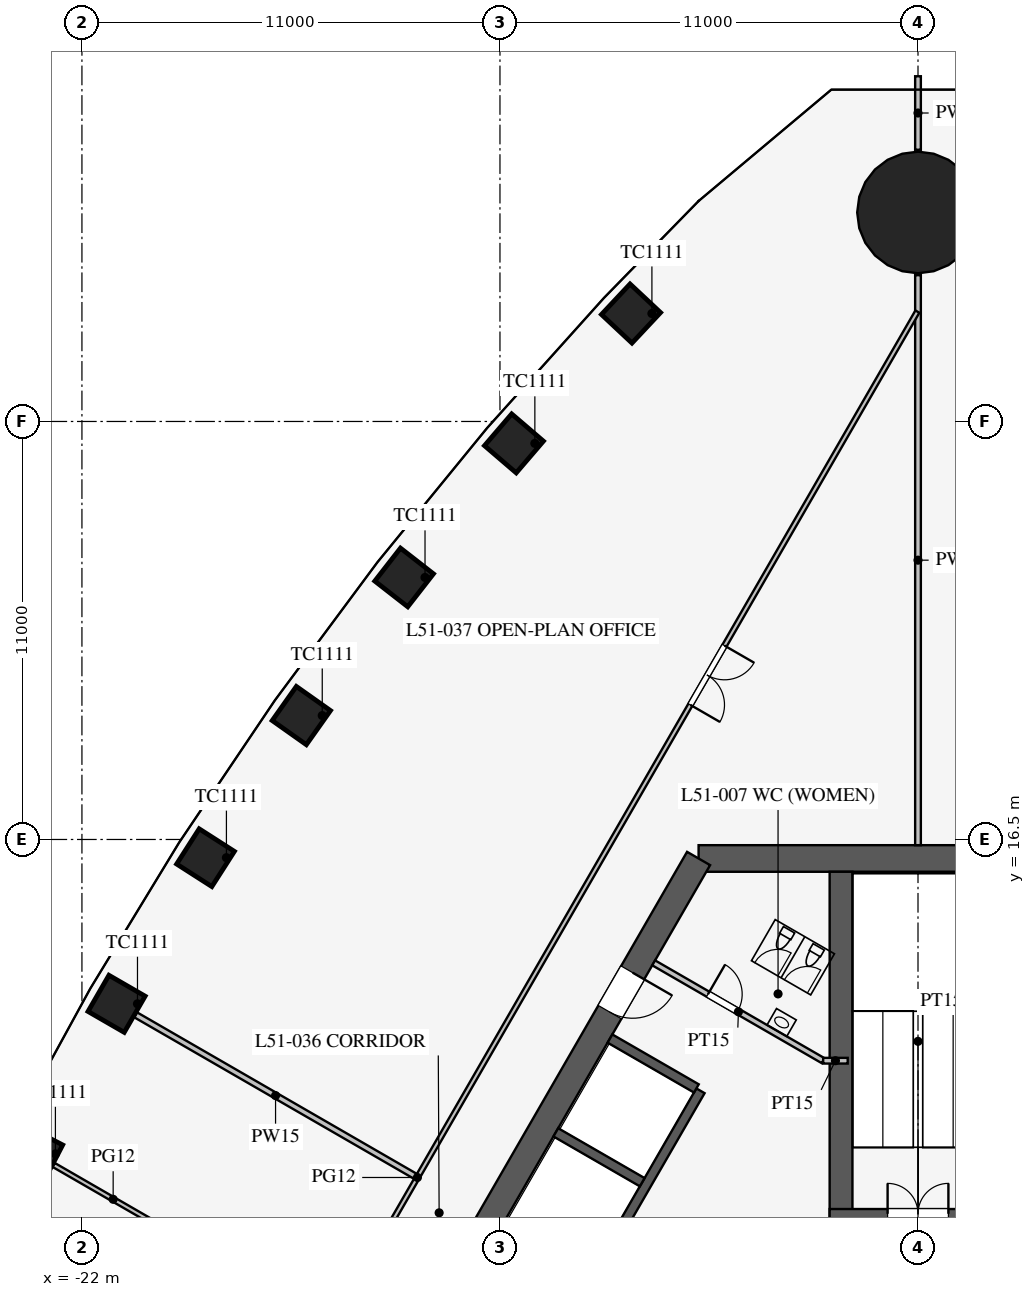
"""IFC4 building model, lengths in metres.
Left out: names, types, materials, properties, quantities, classifications, styles, units other than length and angle.
Written with IfcOpenShell. Run it as: python <this file> out.ifc"""

import sys

from ifc_helpers import new_model, si_unit, direction, frame, frame_2d, origin, origin_2d, place, context, subcontext, project, spatial, rectangle, circle, extrude, element, fill, save


model = new_model("IFC4")
c1 = context("Model", 3, precision=1e-05, world=origin(), true_north=direction((0.0, 1.0)))
c2 = subcontext(c1, "Body", "Model", "MODEL_VIEW")
j1 = project(units=[si_unit("LENGTHUNIT", "METRE"), si_unit("PLANEANGLEUNIT", "RADIAN")], contexts=[c1])
p1 = place(None, origin())
s1 = spatial("IfcSite", under=j1, at=p1, CompositionType="ELEMENT")
p2 = place(p1, origin())
s2 = spatial("IfcBuilding", under=s1, at=p2, CompositionType="ELEMENT")
p3 = place(p2, frame((0.0, 0.0, 223.3)))
s3 = spatial("IfcBuildingStorey", under=s2, at=p3, CompositionType="ELEMENT", Elevation=223.3)
for number, where, z_axis, x_axis in (
    (1, (-7.552, 30.341, 0.0), (0.0, 0.0, 1.0), (-0.684, -0.73, 0.0)),
    (2, (-10.632, 26.923, 0.0), (0.0, 0.0, 1.0), (-0.651, -0.759, 0.0)),
    (3, (-13.522, 23.396, 0.0), (0.0, 0.0, 1.0), (-0.615, -0.789, 0.0)),
    (4, (-16.227, 19.761, 0.0), (0.0, 0.0, 1.0), (-0.577, -0.816, 0.0)),
    (5, (-18.748, 16.02, 0.0), (0.0, 0.0, 1.0), (-0.539, -0.842, 0.0)),
    (6, (-21.088, 12.175, 0.0), (0.0, 0.0, 1.0), (-0.5, -0.866, 0.0)),
    (7, (-23.248, 8.226, 0.0), (0.0, 0.0, 1.0), (-0.46, -0.888, 0.0)),
):
    element("IfcColumn", number, at=place(p3, frame(where, z_axis=z_axis, x_axis=x_axis)), inside=s3, PredefinedType="COLUMN", context=c2, shape_type="SweptSolid", body=[
        extrude(rectangle(XDim=1.1, YDim=1.1, at=origin_2d()), origin(), (0.0, 0.0, 1.0), 4.2),
    ])
p4 = place(p3, frame((0.0, 33.0, 0.0), z_axis=(0.0, 0.0, 1.0), x_axis=(1.0, 0.0, 0.0)))
e8 = element("IfcColumn", 8, at=p4, inside=s3, PredefinedType="COLUMN", context=c2, shape_type="SweptSolid", body=[
    extrude(circle(Radius=1.6, at=origin_2d()), origin(), (0.0, 0.0, 1.0), 4.2),
])
p5 = place(p3, frame((5.773, 16.0, 0.0), z_axis=(0.0, 0.0, 1.0), x_axis=(-1.0, 0.0, 0.0)))
e9 = element("IfcWall", 9, at=p5, inside=s3, PredefinedType="SHEAR", context=c2, shape_type="SweptSolid", body=[
    extrude(rectangle(XDim=11.547, YDim=0.7, at=frame_2d((5.773, 0.0))), origin(), (0.0, 0.0, 1.0), 4.2),
])
p6 = place(p3, frame((-5.773, 16.0, 0.0), z_axis=(0.0, 0.0, 1.0), x_axis=(-0.500002442456, -0.866023993627, 0.0)))
e10 = element("IfcWall", 10, at=p6, inside=s3, PredefinedType="SHEAR", context=c2, shape_type="SweptSolid", body=[
    extrude(rectangle(XDim=21.939, YDim=0.7, at=frame_2d((10.97, 0.0))), origin(), (0.0, 0.0, 1.0), 4.2),
])
p7 = place(p6, frame((17.27, 0.0, 0.0)))
e11 = element("IfcOpeningElement", 11, at=p7, cuts=e10, PredefinedType="OPENING", context=c2, shape_type="SweptSolid", body=[
    extrude(rectangle(XDim=1.2, YDim=2.1, at=frame_2d((0.6, 1.05))), frame((0.0, 0.36, 0.0), z_axis=(0.0, -1.0, 0.0), x_axis=(1.0, 0.0, 0.0)), (0.0, 0.0, 1.0), 0.72),
])
p8 = place(p6, frame((3.47, 0.0, 0.0)))
e12 = element("IfcOpeningElement", 12, at=p8, cuts=e10, PredefinedType="OPENING", context=c2, shape_type="SweptSolid", body=[
    extrude(rectangle(XDim=1.2, YDim=2.1, at=frame_2d((0.6, 1.05))), frame((0.0, 0.36, 0.0), z_axis=(0.0, -1.0, 0.0), x_axis=(1.0, 0.0, 0.0)), (0.0, 0.0, 1.0), 0.72),
])
p9 = place(p3, frame((-5.724, 9.886, 0.0), z_axis=(0.0, 0.0, 1.0), x_axis=(-0.500001763848, -0.866024385424, 0.0)))
e13 = element("IfcWall", 13, at=p9, inside=s3, PredefinedType="SHEAR", context=c2, shape_type="SweptSolid", body=[
    extrude(rectangle(XDim=11.4, YDim=0.25, at=frame_2d((5.7, 0.0))), origin(), (0.0, 0.0, 1.0), 4.2),
])
p10 = place(p9, frame((6.525, 0.0, 0.0)))
e14 = element("IfcOpeningElement", 14, at=p10, cuts=e13, PredefinedType="OPENING", context=c2, shape_type="SweptSolid", body=[
    extrude(rectangle(XDim=1.2, YDim=2.2, at=frame_2d((0.6, 1.1))), frame((0.0, 0.135, 0.0), z_axis=(0.0, -1.0, 0.0), x_axis=(1.0, 0.0, 0.0)), (0.0, 0.0, 1.0), 0.27),
])
p11 = place(p9, frame((9.375, 0.0, 0.0)))
e15 = element("IfcOpeningElement", 15, at=p11, cuts=e13, PredefinedType="OPENING", context=c2, shape_type="SweptSolid", body=[
    extrude(rectangle(XDim=1.2, YDim=2.2, at=frame_2d((0.6, 1.1))), frame((0.0, 0.135, 0.0), z_axis=(0.0, -1.0, 0.0), x_axis=(1.0, 0.0, 0.0)), (0.0, 0.0, 1.0), 0.27),
])
for number, where, z_axis, x_axis in (
    (16, (-5.832, 9.949, 0.0), (0.0, 0.0, 1.0), (-0.866, 0.5, 0.0)),
    (17, (-7.257, 7.481, 0.0), (0.0, 0.0, 1.0), (-0.866, 0.5, 0.0)),
):
    element("IfcWall", number, at=place(p3, frame(where, z_axis=z_axis, x_axis=x_axis)), inside=s3, PredefinedType="SHEAR", context=c2, shape_type="SweptSolid", body=[
        extrude(rectangle(XDim=2.625, YDim=0.25, at=frame_2d((1.312, 0.0))), origin(), (0.0, 0.0, 1.0), 4.2),
    ])
p12 = place(p3, frame((-2.025, 6.525, 0.0), z_axis=(0.0, 0.0, 1.0), x_axis=(0.0, 1.0, 0.0)))
e18 = element("IfcWall", 18, at=p12, inside=s3, PredefinedType="SHEAR", context=c2, shape_type="SweptSolid", body=[
    extrude(rectangle(XDim=9.125, YDim=0.6, at=frame_2d((4.562, 0.0))), origin(), (0.0, 0.0, 1.0), 4.2),
])
p13 = place(p3, frame((2.325, 6.65, 0.0), z_axis=(0.0, 0.0, 1.0), x_axis=(-1.0, 0.0, 0.0)))
e19 = element("IfcWall", 19, at=p13, inside=s3, PredefinedType="SHEAR", context=c2, shape_type="SweptSolid", body=[
    extrude(rectangle(XDim=4.65, YDim=0.25, at=frame_2d((2.325, 0.0))), origin(), (0.0, 0.0, 1.0), 4.2),
])
p14 = place(p13, frame((1.525, 0.0, 0.0)))
e20 = element("IfcOpeningElement", 20, at=p14, cuts=e19, PredefinedType="OPENING", context=c2, shape_type="SweptSolid", body=[
    extrude(rectangle(XDim=1.6, YDim=2.1, at=frame_2d((0.8, 1.05))), frame((0.0, 0.135, 0.0), z_axis=(0.0, -1.0, 0.0), x_axis=(1.0, 0.0, 0.0)), (0.0, 0.0, 1.0), 0.27),
])
p15 = place(p3, frame((-2.495, 10.678, 0.0), z_axis=(0.0, 0.0, 1.0), x_axis=(-0.866037967349, 0.499978238636, 0.0)))
e21 = element("IfcWall", 21, at=p15, inside=s3, PredefinedType="PARTITIONING", context=c2, shape_type="SweptSolid", body=[
    extrude(rectangle(XDim=5.15, YDim=0.15, at=frame_2d((2.575, 0.0))), origin(), (0.0, 0.0, 1.0), 4.0),
])
p16 = place(p15, frame((2.6, 0.0, 0.0)))
e22 = element("IfcOpeningElement", 22, at=p16, cuts=e21, PredefinedType="OPENING", context=c2, shape_type="SweptSolid", body=[
    extrude(rectangle(XDim=0.9, YDim=2.1, at=frame_2d((0.45, 1.05))), frame((0.0, 0.085, 0.0), z_axis=(0.0, -1.0, 0.0), x_axis=(1.0, 0.0, 0.0)), (0.0, 0.0, 1.0), 0.17),
])
p17 = place(p3, frame((-2.495, 10.678, 0.0), z_axis=(0.0, 0.0, 1.0), x_axis=(1.0, 0.0, 0.0)))
e23 = element("IfcWall", 23, at=p17, inside=s3, PredefinedType="PARTITIONING", context=c2, shape_type="SweptSolid", body=[
    extrude(rectangle(XDim=0.645, YDim=0.15, at=frame_2d((0.323, 0.0))), origin(), (0.0, 0.0, 1.0), 4.0),
])
p18 = place(p3, frame((0.0, 16.35, 0.0), z_axis=(0.0, 0.0, 1.0), x_axis=(0.0, 1.0, 0.0)))
e24 = element("IfcWall", 24, at=p18, inside=s3, PredefinedType="PARTITIONING", context=c2, shape_type="SweptSolid", body=[
    extrude(rectangle(XDim=15.0, YDim=0.15, at=frame_2d((7.5, 0.0))), origin(), (0.0, 0.0, 1.0), 2.4),
])
p19 = place(p3, frame((0.0, 34.65, 0.0), z_axis=(0.0, 0.0, 1.0), x_axis=(0.0, 1.0, 0.0)))
e25 = element("IfcWall", 25, at=p19, inside=s3, PredefinedType="PARTITIONING", context=c2, shape_type="SweptSolid", body=[
    extrude(rectangle(XDim=1.935, YDim=0.15, at=frame_2d((0.967, 0.0))), origin(), (0.0, 0.0, 1.0), 2.4),
])
p20 = place(p3, frame((-13.224, 7.635, 0.0), z_axis=(0.0, 0.0, 1.0), x_axis=(-0.86603062717, 0.499990952723, 0.0)))
e26 = element("IfcWall", 26, at=p20, inside=s3, PredefinedType="PARTITIONING", context=c2, shape_type="SweptSolid", body=[
    extrude(rectangle(XDim=8.501, YDim=0.15, at=frame_2d((4.25, 0.0))), origin(), (0.0, 0.0, 1.0), 3.3),
])
p21 = place(p3, frame((-0.016, 30.392, 0.0), z_axis=(0.0, 0.0, 1.0), x_axis=(-0.500000626146, -0.866025042278, 0.0)))
e27 = element("IfcWall", 27, at=p21, inside=s3, PredefinedType="PARTITIONING", context=c2, shape_type="SweptSolid", body=[
    extrude(rectangle(XDim=52.624, YDim=0.12, at=frame_2d((26.312, 0.0))), origin(), (0.0, 0.0, 1.0), 2.9),
])
p22 = place(p21, frame((10.15, 0.0, 0.15)))
e28 = element("IfcOpeningElement", 28, at=p22, cuts=e27, PredefinedType="OPENING", context=c2, shape_type="SweptSolid", body=[
    extrude(rectangle(XDim=1.8, YDim=2.1, at=frame_2d((0.9, 1.05))), frame((0.0, 0.07, 0.0), z_axis=(0.0, -1.0, 0.0), x_axis=(1.0, 0.0, 0.0)), (0.0, 0.0, 1.0), 0.14),
])
p23 = place(p21, frame((40.65, 0.0, 0.15)))
e29 = element("IfcOpeningElement", 29, at=p23, cuts=e27, PredefinedType="OPENING", context=c2, shape_type="SweptSolid", body=[
    extrude(rectangle(XDim=1.8, YDim=2.1, at=frame_2d((0.9, 1.05))), frame((0.0, 0.07, 0.0), z_axis=(0.0, -1.0, 0.0), x_axis=(1.0, 0.0, 0.0)), (0.0, 0.0, 1.0), 0.14),
])
p24 = place(p3, frame((-19.611, 6.126, 0.0), z_axis=(0.0, 0.0, 1.0), x_axis=(-0.86602154905, 0.500006676536, 0.0)))
e30 = element("IfcWall", 30, at=p24, inside=s3, PredefinedType="PARTITIONING", context=c2, shape_type="SweptSolid", body=[
    extrude(rectangle(XDim=3.619, YDim=0.12, at=frame_2d((1.809, 0.0))), origin(), (0.0, 0.0, 1.0), 2.9),
])
p25 = place(p16, frame((0.9, 0.0, 0.0), z_axis=(0.0, 0.0, 1.0), x_axis=(-1.0, 0.0, 0.0)))
e31 = element("IfcDoor", 31, at=p25, inside=s3, OperationType="SINGLE_SWING_LEFT", PredefinedType="DOOR", context=c2, shape_type="SweptSolid", body=[
    extrude(rectangle(XDim=0.9, YDim=2.1, at=frame_2d((0.45, 1.05))), frame((0.0, 0.025, 0.0), z_axis=(0.0, -1.0, 0.0), x_axis=(1.0, 0.0, 0.0)), (0.0, 0.0, 1.0), 0.05),
])
fill(e22, e31)
p26 = place(p14, frame((1.6, 0.0, 0.0), z_axis=(0.0, 0.0, 1.0), x_axis=(-1.0, 0.0, 0.0)))
e32 = element("IfcDoor", 32, at=p26, inside=s3, OperationType="DOUBLE_DOOR_SINGLE_SWING", PredefinedType="DOOR", context=c2, shape_type="SweptSolid", body=[
    extrude(rectangle(XDim=1.6, YDim=2.1, at=frame_2d((0.8, 1.05))), frame((0.0, 0.025, 0.0), z_axis=(0.0, -1.0, 0.0), x_axis=(1.0, 0.0, 0.0)), (0.0, 0.0, 1.0), 0.05),
])
fill(e20, e32)
p27 = place(p8, origin())
e33 = element("IfcDoor", 33, at=p27, inside=s3, OperationType="SINGLE_SWING_LEFT", PredefinedType="DOOR", context=c2, shape_type="SweptSolid", body=[
    extrude(rectangle(XDim=1.2, YDim=2.1, at=frame_2d((0.6, 1.05))), frame((0.0, 0.025, 0.0), z_axis=(0.0, -1.0, 0.0), x_axis=(1.0, 0.0, 0.0)), (0.0, 0.0, 1.0), 0.05),
])
fill(e12, e33)
p28 = place(p22, origin())
e34 = element("IfcDoor", 34, at=p28, inside=s3, OperationType="DOUBLE_DOOR_SINGLE_SWING", PredefinedType="DOOR", context=c2, shape_type="SweptSolid", body=[
    extrude(rectangle(XDim=1.8, YDim=2.1, at=frame_2d((0.9, 1.05))), frame((0.0, 0.025, 0.0), z_axis=(0.0, -1.0, 0.0), x_axis=(1.0, 0.0, 0.0)), (0.0, 0.0, 1.0), 0.05),
])
fill(e28, e34)
save(model, sys.argv[1])
